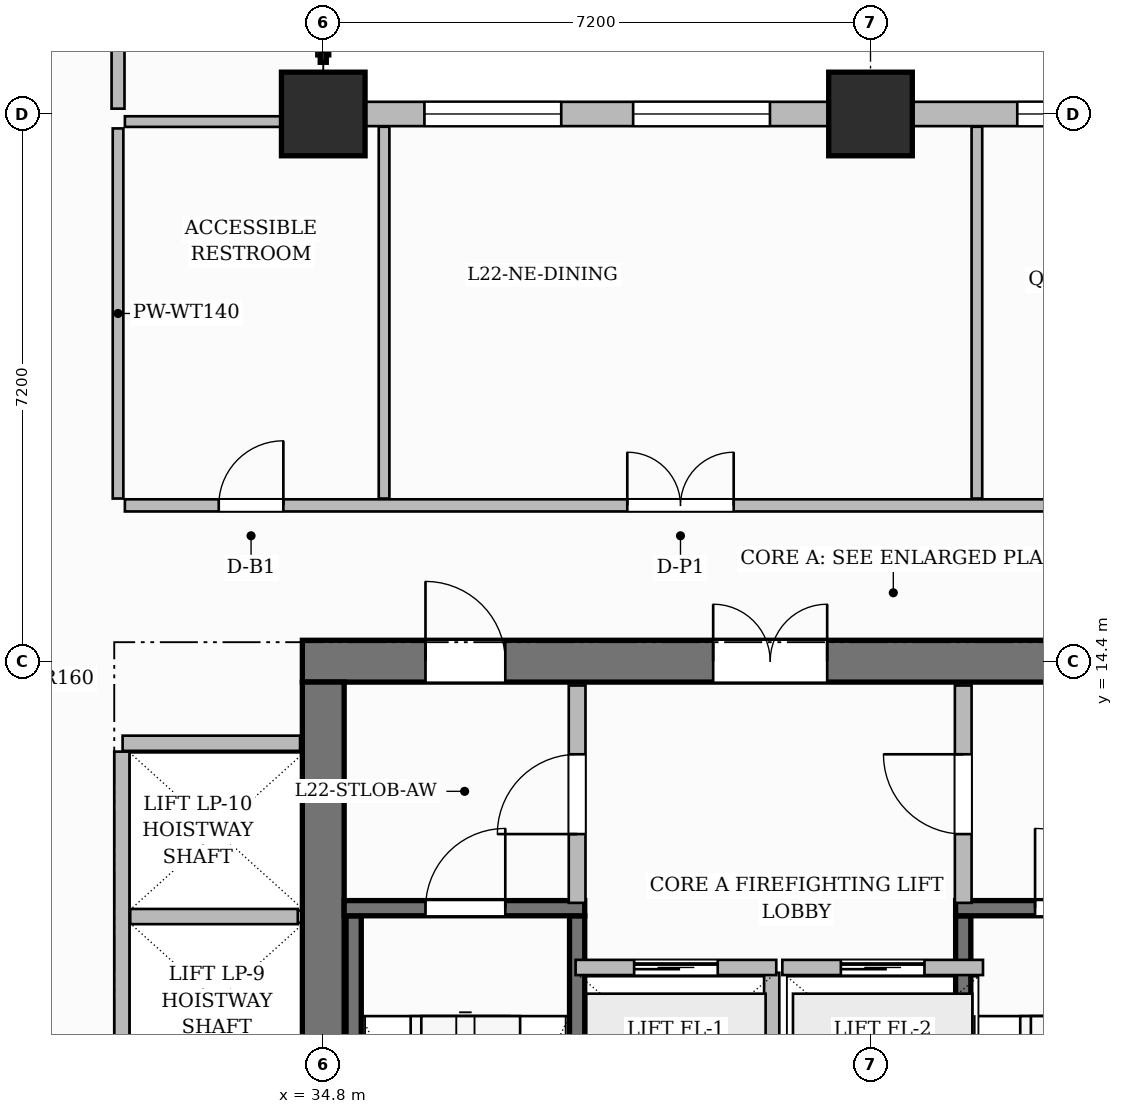
"""IFC4 building model, lengths in metres.
Left out: names, types, materials, properties, quantities, classifications, styles, units other than length and angle.
Written with IfcOpenShell. Run it as: python <this file> out.ifc"""

import sys

from ifc_helpers import new_model, si_unit, direction, frame, frame_2d, origin, origin_2d, place, context, subcontext, project, spatial, rectangle, extrude, source, transform, mapped, element, fill, save


model = new_model("IFC4")
c1 = context("Model", 3, precision=1e-05, world=origin(), true_north=direction((0.0, 1.0)))
c2 = subcontext(c1, "Body", "Model", "MODEL_VIEW")
j1 = project(units=[si_unit("LENGTHUNIT", "METRE"), si_unit("PLANEANGLEUNIT", "RADIAN")], contexts=[c1])
p1 = place(None, origin())
s1 = spatial("IfcSite", under=j1, at=p1, CompositionType="ELEMENT")
p2 = place(p1, origin())
s2 = spatial("IfcBuilding", under=s1, at=p2, CompositionType="ELEMENT")
p3 = place(p2, frame((0.0, 0.0, 91.6)))
s3 = spatial("IfcBuildingStorey", under=s2, at=p3, CompositionType="ELEMENT", Elevation=91.6)
p4 = place(p3, frame((34.525, 14.4, 0.0), z_axis=(0.0, 0.0, 1.0), x_axis=(1.0, 0.0, 0.0)))
e1 = element("IfcWall", 1, at=p4, inside=s3, PredefinedType="SHEAR", context=c2, shape_type="SweptSolid", body=[
    extrude(rectangle(XDim=15.55, YDim=0.55, at=frame_2d((7.775, 0.0))), origin(), (0.0, 0.0, 1.0), 3.7),
])
p5 = place(p4, frame((5.405, 0.0, 0.0)))
e2 = element("IfcOpeningElement", 2, at=p5, cuts=e1, PredefinedType="OPENING", context=c2, shape_type="SweptSolid", body=[
    extrude(rectangle(XDim=1.5, YDim=2.2, at=frame_2d((0.75, 1.1))), frame((0.0, 0.285, 0.0), z_axis=(0.0, -1.0, 0.0), x_axis=(1.0, 0.0, 0.0)), (0.0, 0.0, 1.0), 0.57),
])
p6 = place(p4, frame((1.62, 0.0, 0.0)))
e3 = element("IfcOpeningElement", 3, at=p6, cuts=e1, PredefinedType="OPENING", context=c2, shape_type="SweptSolid", body=[
    extrude(rectangle(XDim=1.05, YDim=2.15, at=frame_2d((0.525, 1.075))), frame((0.0, 0.285, 0.0), z_axis=(0.0, -1.0, 0.0), x_axis=(1.0, 0.0, 0.0)), (0.0, 0.0, 1.0), 0.57),
])
p7 = place(p4, frame((11.25, 0.0, 0.0)))
e4 = element("IfcOpeningElement", 4, at=p7, cuts=e1, PredefinedType="OPENING", context=c2, shape_type="SweptSolid", body=[
    extrude(rectangle(XDim=1.05, YDim=2.15, at=frame_2d((0.525, 1.075))), frame((0.0, 0.285, 0.0), z_axis=(0.0, -1.0, 0.0), x_axis=(1.0, 0.0, 0.0)), (0.0, 0.0, 1.0), 0.57),
])
p8 = place(p3, frame((34.8, 3.875, 0.0), z_axis=(0.0, 0.0, 1.0), x_axis=(0.0, 1.0, 0.0)))
e5 = element("IfcWall", 5, at=p8, inside=s3, PredefinedType="SHEAR", context=c2, shape_type="SweptSolid", body=[
    extrude(rectangle(XDim=10.25, YDim=0.55, at=frame_2d((5.125, 0.0))), origin(), (0.0, 0.0, 1.0), 3.7),
])
m1 = source(origin(), c2, "Body", "SweptSolid", [
    extrude(rectangle(XDim=1.1, YDim=1.1, at=origin_2d()), origin(), (0.0, 0.0, 1.0), 3.7),
])
for number, where, z_axis, x_axis in (
    (6, (34.8, 21.6, 0.0), (0.0, 0.0, 1.0), (1.0, 0.0, 0.0)),
    (7, (42.0, 21.6, 0.0), (0.0, 0.0, 1.0), (1.0, 0.0, 0.0)),
):
    element("IfcColumn", number, at=place(p3, frame(where, z_axis=z_axis, x_axis=x_axis)), inside=s3, PredefinedType="COLUMN", context=c2, shape_type="MappedRepresentation", body=[
        mapped(m1, transform((0.0, 0.0, 0.0), scale=1.0)),
    ])
for number, where, z_axis, x_axis in (
    (8, (35.2, 4.1, 0.0), (0.0, 0.0, 1.0), (0.0, 1.0, 0.0)),
    (9, (38.14, 4.1, 0.0), (0.0, 0.0, 1.0), (0.0, 1.0, 0.0)),
):
    element("IfcWall", number, at=place(p3, frame(where, z_axis=z_axis, x_axis=x_axis)), inside=s3, PredefinedType="SHEAR", context=c2, shape_type="SweptSolid", body=[
        extrude(rectangle(XDim=6.95, YDim=0.2, at=frame_2d((3.475, 0.0))), origin(), (0.0, 0.0, 1.0), 3.7),
    ])
p9 = place(p3, frame((35.075, 11.15, 0.0), z_axis=(0.0, 0.0, 1.0), x_axis=(1.0, 0.0, 0.0)))
e10 = element("IfcWall", 10, at=p9, inside=s3, PredefinedType="SHEAR", context=c2, shape_type="SweptSolid", body=[
    extrude(rectangle(XDim=3.165, YDim=0.2, at=frame_2d((1.583, 0.0))), origin(), (0.0, 0.0, 1.0), 3.7),
])
p10 = place(p9, frame((1.07, 0.0, 0.0)))
e11 = element("IfcOpeningElement", 11, at=p10, cuts=e10, PredefinedType="OPENING", context=c2, shape_type="SweptSolid", body=[
    extrude(rectangle(XDim=1.05, YDim=2.2, at=frame_2d((0.525, 1.1))), frame((0.0, 0.11, 0.0), z_axis=(0.0, -1.0, 0.0), x_axis=(1.0, 0.0, 0.0)), (0.0, 0.0, 1.0), 0.22),
])
p11 = place(p3, frame((43.22, 4.1, 0.0), z_axis=(0.0, 0.0, 1.0), x_axis=(0.0, 1.0, 0.0)))
e12 = element("IfcWall", 12, at=p11, inside=s3, PredefinedType="SHEAR", context=c2, shape_type="SweptSolid", body=[
    extrude(rectangle(XDim=6.95, YDim=0.2, at=frame_2d((3.475, 0.0))), origin(), (0.0, 0.0, 1.0), 3.7),
])
p12 = place(p3, frame((43.12, 11.15, 0.0), z_axis=(0.0, 0.0, 1.0), x_axis=(1.0, 0.0, 0.0)))
e13 = element("IfcWall", 13, at=p12, inside=s3, PredefinedType="SHEAR", context=c2, shape_type="SweptSolid", body=[
    extrude(rectangle(XDim=6.405, YDim=0.2, at=frame_2d((3.202, 0.0))), origin(), (0.0, 0.0, 1.0), 3.7),
])
p13 = place(p12, frame((1.045, 0.0, 0.0)))
e14 = element("IfcOpeningElement", 14, at=p13, cuts=e13, PredefinedType="OPENING", context=c2, shape_type="SweptSolid", body=[
    extrude(rectangle(XDim=1.05, YDim=2.2, at=frame_2d((0.525, 1.1))), frame((0.0, 0.11, 0.0), z_axis=(0.0, -1.0, 0.0), x_axis=(1.0, 0.0, 0.0)), (0.0, 0.0, 1.0), 0.22),
])
p14 = place(p12, frame((4.125, 0.0, 0.0)))
e15 = element("IfcOpeningElement", 15, at=p14, cuts=e13, PredefinedType="OPENING", context=c2, shape_type="SweptSolid", body=[
    extrude(rectangle(XDim=1.05, YDim=2.2, at=frame_2d((0.525, 1.1))), frame((0.0, 0.11, 0.0), z_axis=(0.0, -1.0, 0.0), x_axis=(1.0, 0.0, 0.0)), (0.0, 0.0, 1.0), 0.22),
])
p15 = place(p3, frame((40.7, 8.12, 0.0), z_axis=(0.0, 0.0, 1.0), x_axis=(0.0, 1.0, 0.0)))
e16 = element("IfcWall", 16, at=p15, inside=s3, PredefinedType="PARTITIONING", context=c2, shape_type="SweptSolid", body=[
    extrude(rectangle(XDim=2.18, YDim=0.2, at=frame_2d((1.09, 0.0))), origin(), (0.0, 0.0, 1.0), 3.45),
])
p16 = place(p3, frame((38.14, 11.22, 0.0), z_axis=(0.0, 0.0, 1.0), x_axis=(0.0, 1.0, 0.0)))
e17 = element("IfcWall", 17, at=p16, inside=s3, PredefinedType="PARTITIONING", context=c2, shape_type="SweptSolid", body=[
    extrude(rectangle(XDim=2.86, YDim=0.22, at=frame_2d((1.43, 0.0))), origin(), (0.0, 0.0, 1.0), 3.45),
])
p17 = place(p16, frame((0.905, 0.0, 0.0)))
e18 = element("IfcOpeningElement", 18, at=p17, cuts=e17, PredefinedType="OPENING", context=c2, shape_type="SweptSolid", body=[
    extrude(rectangle(XDim=1.05, YDim=2.15, at=frame_2d((0.525, 1.075))), frame((0.0, 0.12, 0.0), z_axis=(0.0, -1.0, 0.0), x_axis=(1.0, 0.0, 0.0)), (0.0, 0.0, 1.0), 0.24),
])
p18 = place(p3, frame((43.22, 11.22, 0.0), z_axis=(0.0, 0.0, 1.0), x_axis=(0.0, 1.0, 0.0)))
e19 = element("IfcWall", 19, at=p18, inside=s3, PredefinedType="PARTITIONING", context=c2, shape_type="SweptSolid", body=[
    extrude(rectangle(XDim=2.86, YDim=0.22, at=frame_2d((1.43, 0.0))), origin(), (0.0, 0.0, 1.0), 3.45),
])
p19 = place(p18, frame((0.905, 0.0, 0.0)))
e20 = element("IfcOpeningElement", 20, at=p19, cuts=e19, PredefinedType="OPENING", context=c2, shape_type="SweptSolid", body=[
    extrude(rectangle(XDim=1.05, YDim=2.15, at=frame_2d((0.525, 1.075))), frame((0.0, 0.12, 0.0), z_axis=(0.0, -1.0, 0.0), x_axis=(1.0, 0.0, 0.0)), (0.0, 0.0, 1.0), 0.24),
])
p20 = place(p3, frame((32.16, 13.32, 0.0), z_axis=(0.0, 0.0, 1.0), x_axis=(1.0, 0.0, 0.0)))
e21 = element("IfcWall", 21, at=p20, inside=s3, PredefinedType="PARTITIONING", context=c2, shape_type="SweptSolid", body=[
    extrude(rectangle(XDim=2.335, YDim=0.2, at=frame_2d((1.167, 0.0))), origin(), (0.0, 0.0, 1.0), 3.45),
])
p21 = place(p3, frame((32.15, 4.39, 0.0), z_axis=(0.0, 0.0, 1.0), x_axis=(0.0, 1.0, 0.0)))
e22 = element("IfcWall", 22, at=p21, inside=s3, PredefinedType="PARTITIONING", context=c2, shape_type="SweptSolid", body=[
    extrude(rectangle(XDim=8.82, YDim=0.2, at=frame_2d((4.41, 0.0))), origin(), (0.0, 0.0, 1.0), 3.45),
])
p22 = place(p3, frame((32.26, 11.04, 0.0), z_axis=(0.0, 0.0, 1.0), x_axis=(1.0, 0.0, 0.0)))
e23 = element("IfcWall", 23, at=p22, inside=s3, PredefinedType="PARTITIONING", context=c2, shape_type="SweptSolid", body=[
    extrude(rectangle(XDim=2.205, YDim=0.2, at=frame_2d((1.103, 0.0))), origin(), (0.0, 0.0, 1.0), 3.45),
])
p23 = place(p3, frame((32.19, 16.45, 0.0), z_axis=(0.0, 0.0, 1.0), x_axis=(1.0, 0.0, 0.0)))
e24 = element("IfcWall", 24, at=p23, inside=s3, PredefinedType="PARTITIONING", context=c2, shape_type="SweptSolid", body=[
    extrude(rectangle(XDim=17.47, YDim=0.16, at=frame_2d((8.735, 0.0))), origin(), (0.0, 0.0, 1.0), 3.45),
])
p24 = place(p23, frame((1.235, 0.0, 0.0)))
e25 = element("IfcOpeningElement", 25, at=p24, cuts=e24, PredefinedType="OPENING", context=c2, shape_type="SweptSolid", body=[
    extrude(rectangle(XDim=0.85, YDim=2.1, at=frame_2d((0.425, 1.05))), frame((0.0, 0.09, 0.0), z_axis=(0.0, -1.0, 0.0), x_axis=(1.0, 0.0, 0.0)), (0.0, 0.0, 1.0), 0.18),
])
p25 = place(p23, frame((6.61, 0.0, 0.0)))
e26 = element("IfcOpeningElement", 26, at=p25, cuts=e24, PredefinedType="OPENING", context=c2, shape_type="SweptSolid", body=[
    extrude(rectangle(XDim=1.4, YDim=2.35, at=frame_2d((0.7, 1.175))), frame((0.0, 0.09, 0.0), z_axis=(0.0, -1.0, 0.0), x_axis=(1.0, 0.0, 0.0)), (0.0, 0.0, 1.0), 0.18),
])
p26 = place(p23, frame((13.885, 0.0, 0.0)))
e27 = element("IfcOpeningElement", 27, at=p26, cuts=e24, PredefinedType="OPENING", context=c2, shape_type="SweptSolid", body=[
    extrude(rectangle(XDim=0.95, YDim=2.15, at=frame_2d((0.475, 1.075))), frame((0.0, 0.09, 0.0), z_axis=(0.0, -1.0, 0.0), x_axis=(1.0, 0.0, 0.0)), (0.0, 0.0, 1.0), 0.18),
])
p27 = place(p3, frame((32.1, 16.54, 0.0), z_axis=(0.0, 0.0, 1.0), x_axis=(0.0, 1.0, 0.0)))
e28 = element("IfcWall", 28, at=p27, inside=s3, PredefinedType="PARTITIONING", context=c2, shape_type="SweptSolid", body=[
    extrude(rectangle(XDim=4.87, YDim=0.14, at=frame_2d((2.435, 0.0))), origin(), (0.0, 0.0, 1.0), 3.45),
])
for number, where, z_axis, x_axis in (
    (29, (35.6, 16.54, 0.0), (0.0, 0.0, 1.0), (0.0, 1.0, 0.0)),
    (30, (43.4, 16.54, 0.0), (0.0, 0.0, 1.0), (0.0, 1.0, 0.0)),
):
    element("IfcWall", number, at=place(p3, frame(where, z_axis=z_axis, x_axis=x_axis)), inside=s3, PredefinedType="PARTITIONING", context=c2, shape_type="SweptSolid", body=[
        extrude(rectangle(XDim=4.892, YDim=0.14, at=frame_2d((2.446, 0.0))), origin(), (0.0, 0.0, 1.0), 3.45),
    ])
p28 = place(p3, frame((32.19, 21.5, 0.0), z_axis=(0.0, 0.0, 1.0), x_axis=(1.0, 0.0, 0.0)))
e31 = element("IfcWall", 31, at=p28, inside=s3, PredefinedType="PARTITIONING", context=c2, shape_type="SweptSolid", body=[
    extrude(rectangle(XDim=2.42, YDim=0.14, at=frame_2d((1.21, 0.0))), origin(), (0.0, 0.0, 1.0), 2.885),
])
p29 = place(p3, frame((32.1, 21.67, 0.0), z_axis=(0.0, 0.0, 1.0), x_axis=(0.0, 1.0, 0.0)))
e32 = element("IfcWall", 32, at=p29, inside=s3, PredefinedType="PARTITIONING", context=c2, shape_type="SweptSolid", body=[
    extrude(rectangle(XDim=10.702, YDim=0.17, at=frame_2d((5.351, 0.0))), origin(), (0.0, 0.0, 1.0), 3.45),
])
p30 = place(p29, frame((4.43, 0.0, 0.0)))
e33 = element("IfcOpeningElement", 33, at=p30, cuts=e32, PredefinedType="OPENING", context=c2, shape_type="SweptSolid", body=[
    extrude(rectangle(XDim=1.4, YDim=2.35, at=frame_2d((0.7, 1.175))), frame((0.0, 0.095, 0.0), z_axis=(0.0, -1.0, 0.0), x_axis=(1.0, 0.0, 0.0)), (0.0, 0.0, 1.0), 0.19),
])
p31 = place(p3, frame((38.12, 10.37, 0.0), z_axis=(0.0, 0.0, 1.0), x_axis=(1.0, 0.0, 0.0)))
e34 = element("IfcWall", 34, at=p31, inside=s3, PredefinedType="PARTITIONING", context=c2, shape_type="SweptSolid", body=[
    extrude(rectangle(XDim=2.64, YDim=0.2, at=frame_2d((1.32, 0.0))), origin(), (0.0, 0.0, 1.0), 3.45),
])
p32 = place(p31, frame((0.77, 0.0, 0.0)))
e35 = element("IfcOpeningElement", 35, at=p32, cuts=e34, PredefinedType="OPENING", context=c2, shape_type="SweptSolid", body=[
    extrude(rectangle(XDim=1.1, YDim=2.2, at=frame_2d((0.55, 1.1))), frame((0.0, 0.11, 0.0), z_axis=(0.0, -1.0, 0.0), x_axis=(1.0, 0.0, 0.0)), (0.0, 0.0, 1.0), 0.22),
])
p33 = place(p3, frame((40.84, 10.37, 0.0), z_axis=(0.0, 0.0, 1.0), x_axis=(1.0, 0.0, 0.0)))
e36 = element("IfcWall", 36, at=p33, inside=s3, PredefinedType="PARTITIONING", context=c2, shape_type="SweptSolid", body=[
    extrude(rectangle(XDim=2.64, YDim=0.2, at=frame_2d((1.32, 0.0))), origin(), (0.0, 0.0, 1.0), 3.45),
])
p34 = place(p33, frame((0.77, 0.0, 0.0)))
e37 = element("IfcOpeningElement", 37, at=p34, cuts=e36, PredefinedType="OPENING", context=c2, shape_type="SweptSolid", body=[
    extrude(rectangle(XDim=1.1, YDim=2.2, at=frame_2d((0.55, 1.1))), frame((0.0, 0.11, 0.0), z_axis=(0.0, -1.0, 0.0), x_axis=(1.0, 0.0, 0.0)), (0.0, 0.0, 1.0), 0.22),
])
p35 = place(p3, frame((34.8, 21.6, 0.0), z_axis=(0.0, 0.0, 1.0), x_axis=(1.0, 0.0, 0.0)))
e38 = element("IfcWall", 38, at=p35, inside=s3, PredefinedType="SOLIDWALL", context=c2, shape_type="SweptSolid", body=[
    extrude(rectangle(XDim=22.8, YDim=0.32, at=frame_2d((11.4, 0.0))), origin(), (0.0, 0.0, 1.0), 2.885),
])
p36 = place(p35, frame((1.331, 0.0, 0.8)))
e39 = element("IfcOpeningElement", 39, at=p36, cuts=e38, PredefinedType="OPENING", context=c2, shape_type="SweptSolid", body=[
    extrude(rectangle(XDim=1.8, YDim=1.85, at=frame_2d((0.9, 0.925))), frame((0.0, 0.17, 0.0), z_axis=(0.0, -1.0, 0.0), x_axis=(1.0, 0.0, 0.0)), (0.0, 0.0, 1.0), 0.34),
])
p37 = place(p35, frame((4.077, 0.0, 0.8)))
e40 = element("IfcOpeningElement", 40, at=p37, cuts=e38, PredefinedType="OPENING", context=c2, shape_type="SweptSolid", body=[
    extrude(rectangle(XDim=1.8, YDim=1.85, at=frame_2d((0.9, 0.925))), frame((0.0, 0.17, 0.0), z_axis=(0.0, -1.0, 0.0), x_axis=(1.0, 0.0, 0.0)), (0.0, 0.0, 1.0), 0.34),
])
p38 = place(p35, frame((9.131, 0.0, 0.8)))
e41 = element("IfcOpeningElement", 41, at=p38, cuts=e38, PredefinedType="OPENING", context=c2, shape_type="SweptSolid", body=[
    extrude(rectangle(XDim=1.8, YDim=1.85, at=frame_2d((0.9, 0.925))), frame((0.0, 0.17, 0.0), z_axis=(0.0, -1.0, 0.0), x_axis=(1.0, 0.0, 0.0)), (0.0, 0.0, 1.0), 0.34),
])
p39 = place(p35, frame((11.877, 0.0, 0.8)))
e42 = element("IfcOpeningElement", 42, at=p39, cuts=e38, PredefinedType="OPENING", context=c2, shape_type="SweptSolid", body=[
    extrude(rectangle(XDim=1.8, YDim=1.85, at=frame_2d((0.9, 0.925))), frame((0.0, 0.17, 0.0), z_axis=(0.0, -1.0, 0.0), x_axis=(1.0, 0.0, 0.0)), (0.0, 0.0, 1.0), 0.34),
])
p40 = place(p35, frame((16.475, 0.0, 0.8)))
e43 = element("IfcOpeningElement", 43, at=p40, cuts=e38, PredefinedType="OPENING", context=c2, shape_type="SweptSolid", body=[
    extrude(rectangle(XDim=1.8, YDim=1.85, at=frame_2d((0.9, 0.925))), frame((0.0, 0.17, 0.0), z_axis=(0.0, -1.0, 0.0), x_axis=(1.0, 0.0, 0.0)), (0.0, 0.0, 1.0), 0.34),
])
p41 = place(p35, frame((19.525, 0.0, 0.8)))
e44 = element("IfcOpeningElement", 44, at=p41, cuts=e38, PredefinedType="OPENING", context=c2, shape_type="SweptSolid", body=[
    extrude(rectangle(XDim=1.8, YDim=1.85, at=frame_2d((0.9, 0.925))), frame((0.0, 0.17, 0.0), z_axis=(0.0, -1.0, 0.0), x_axis=(1.0, 0.0, 0.0)), (0.0, 0.0, 1.0), 0.34),
])
m2 = source(origin(), c2, "Body", "SweptSolid", [
    extrude(rectangle(XDim=1.05, YDim=2.2, at=frame_2d((0.525, 1.1))), frame((0.0, 0.025, 0.0), z_axis=(0.0, -1.0, 0.0), x_axis=(1.0, 0.0, 0.0)), (0.0, 0.0, 1.0), 0.05),
])
p42 = place(p10, origin())
e45 = element("IfcDoor", 45, at=p42, inside=s3, OperationType="SINGLE_SWING_RIGHT", PredefinedType="DOOR", context=c2, shape_type="MappedRepresentation", body=[
    mapped(m2, transform((0.0, 0.0, 0.0), scale=1.0)),
])
fill(e11, e45)
p43 = place(p13, origin())
e46 = element("IfcDoor", 46, at=p43, inside=s3, OperationType="SINGLE_SWING_LEFT", PredefinedType="DOOR", context=c2, shape_type="MappedRepresentation", body=[
    mapped(m2, transform((0.0, 0.0, 0.0), scale=1.0)),
])
fill(e14, e46)
m3 = source(origin(), c2, "Body", "SweptSolid", [
    extrude(rectangle(XDim=1.05, YDim=2.15, at=frame_2d((0.525, 1.075))), frame((0.0, 0.025, 0.0), z_axis=(0.0, -1.0, 0.0), x_axis=(1.0, 0.0, 0.0)), (0.0, 0.0, 1.0), 0.05),
])
p44 = place(p17, origin())
e47 = element("IfcDoor", 47, at=p44, inside=s3, OperationType="SINGLE_SWING_LEFT", PredefinedType="DOOR", context=c2, shape_type="MappedRepresentation", body=[
    mapped(m3, transform((0.0, 0.0, 0.0), scale=1.0)),
])
fill(e18, e47)
p45 = place(p19, origin())
e48 = element("IfcDoor", 48, at=p45, inside=s3, OperationType="SINGLE_SWING_RIGHT", PredefinedType="DOOR", context=c2, shape_type="MappedRepresentation", body=[
    mapped(m3, transform((0.0, 0.0, 0.0), scale=1.0)),
])
fill(e20, e48)
m4 = source(origin(), c2, "Body", "SweptSolid", [
    extrude(rectangle(XDim=1.5, YDim=2.2, at=frame_2d((0.75, 1.1))), frame((0.0, 0.025, 0.0), z_axis=(0.0, -1.0, 0.0), x_axis=(1.0, 0.0, 0.0)), (0.0, 0.0, 1.0), 0.05),
])
p46 = place(p5, origin())
e49 = element("IfcDoor", 49, at=p46, inside=s3, OperationType="DOUBLE_DOOR_SINGLE_SWING", PredefinedType="DOOR", context=c2, shape_type="MappedRepresentation", body=[
    mapped(m4, transform((0.0, 0.0, 0.0), scale=1.0)),
])
fill(e2, e49)
p47 = place(p6, origin())
e50 = element("IfcDoor", 50, at=p47, inside=s3, OperationType="SINGLE_SWING_LEFT", PredefinedType="DOOR", context=c2, shape_type="MappedRepresentation", body=[
    mapped(m3, transform((0.0, 0.0, 0.0), scale=1.0)),
])
fill(e3, e50)
m5 = source(origin(), c2, "Body", "SweptSolid", [
    extrude(rectangle(XDim=0.85, YDim=2.1, at=frame_2d((0.425, 1.05))), frame((0.0, 0.025, 0.0), z_axis=(0.0, -1.0, 0.0), x_axis=(1.0, 0.0, 0.0)), (0.0, 0.0, 1.0), 0.05),
])
p48 = place(p24, origin())
e51 = element("IfcDoor", 51, at=p48, inside=s3, OperationType="SINGLE_SWING_RIGHT", PredefinedType="DOOR", context=c2, shape_type="MappedRepresentation", body=[
    mapped(m5, transform((0.0, 0.0, 0.0), scale=1.0)),
])
fill(e25, e51)
m6 = source(origin(), c2, "Body", "SweptSolid", [
    extrude(rectangle(XDim=1.4, YDim=2.35, at=frame_2d((0.7, 1.175))), frame((0.0, 0.025, 0.0), z_axis=(0.0, -1.0, 0.0), x_axis=(1.0, 0.0, 0.0)), (0.0, 0.0, 1.0), 0.05),
])
p49 = place(p25, origin())
e52 = element("IfcDoor", 52, at=p49, inside=s3, OperationType="DOUBLE_DOOR_SINGLE_SWING", PredefinedType="DOOR", context=c2, shape_type="MappedRepresentation", body=[
    mapped(m6, transform((0.0, 0.0, 0.0), scale=1.0)),
])
fill(e26, e52)
m7 = source(origin(), c2, "Body", "SweptSolid", [
    extrude(rectangle(XDim=1.1, YDim=2.2, at=frame_2d((0.55, 1.1))), frame((0.0, 0.025, 0.0), z_axis=(0.0, -1.0, 0.0), x_axis=(1.0, 0.0, 0.0)), (0.0, 0.0, 1.0), 0.05),
])
p50 = place(p32, origin())
e53 = element("IfcDoor", 53, at=p50, inside=s3, OperationType="SLIDING_TO_LEFT", PredefinedType="DOOR", context=c2, shape_type="MappedRepresentation", body=[
    mapped(m7, transform((0.0, 0.0, 0.0), scale=1.0)),
])
fill(e35, e53)
p51 = place(p34, origin())
e54 = element("IfcDoor", 54, at=p51, inside=s3, OperationType="SLIDING_TO_LEFT", PredefinedType="DOOR", context=c2, shape_type="MappedRepresentation", body=[
    mapped(m7, transform((0.0, 0.0, 0.0), scale=1.0)),
])
fill(e37, e54)
m8 = source(origin(), c2, "Body", "SweptSolid", [
    extrude(rectangle(XDim=1.8, YDim=1.85, at=frame_2d((0.9, 0.925))), frame((0.0, 0.03, 0.0), z_axis=(0.0, -1.0, 0.0), x_axis=(1.0, 0.0, 0.0)), (0.0, 0.0, 1.0), 0.06),
])
p52 = place(p36, origin())
e55 = element("IfcWindow", 55, at=p52, inside=s3, PartitioningType="DOUBLE_PANEL_VERTICAL", PredefinedType="WINDOW", context=c2, shape_type="MappedRepresentation", body=[
    mapped(m8, transform((0.0, 0.0, 0.0), scale=1.0)),
])
fill(e39, e55)
p53 = place(p37, origin())
e56 = element("IfcWindow", 56, at=p53, inside=s3, PartitioningType="DOUBLE_PANEL_VERTICAL", PredefinedType="WINDOW", context=c2, shape_type="MappedRepresentation", body=[
    mapped(m8, transform((0.0, 0.0, 0.0), scale=1.0)),
])
fill(e40, e56)
p54 = place(p38, origin())
e57 = element("IfcWindow", 57, at=p54, inside=s3, PartitioningType="DOUBLE_PANEL_VERTICAL", PredefinedType="WINDOW", context=c2, shape_type="MappedRepresentation", body=[
    mapped(m8, transform((0.0, 0.0, 0.0), scale=1.0)),
])
fill(e41, e57)
save(model, sys.argv[1])
